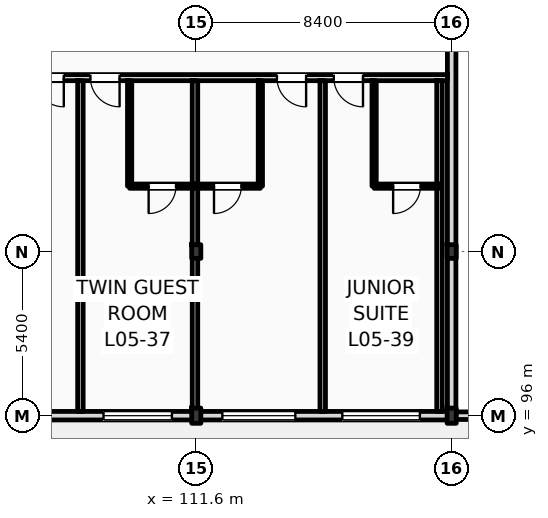
"""IFC4 building model, lengths in metres.
Left out: names, types, materials, properties, quantities, classifications, styles, units other than length and angle.
Written with IfcOpenShell. Run it as: python <this file> out.ifc"""

import sys

from ifc_helpers import new_model, si_unit, direction, frame, frame_2d, origin, origin_2d, place, context, subcontext, project, spatial, rectangle, i_section, extrude, element, fill, save


model = new_model("IFC4")
c1 = context("Model", 3, precision=1e-05, world=origin(), true_north=direction((0.0, 1.0)))
c2 = subcontext(c1, "Body", "Model", "MODEL_VIEW")
j1 = project(units=[si_unit("LENGTHUNIT", "METRE"), si_unit("PLANEANGLEUNIT", "RADIAN")], contexts=[c1])
p1 = place(None, origin())
s1 = spatial("IfcSite", under=j1, at=p1, CompositionType="ELEMENT")
p2 = place(p1, origin())
s2 = spatial("IfcBuilding", under=s1, at=p2, CompositionType="ELEMENT")
p3 = place(p2, frame((0.0, 0.0, 24.6)))
s3 = spatial("IfcBuildingStorey", under=s2, at=p3, CompositionType="ELEMENT", Elevation=24.6)
p4 = place(p3, frame((111.6, 96.0, 0.0), z_axis=(0.0, 0.0, 1.0), x_axis=(1.0, 0.0, 0.0)))
e1 = element("IfcColumn", 1, at=p4, inside=s3, PredefinedType="COLUMN", context=c2, shape_type="SweptSolid", body=[
    extrude(i_section(OverallWidth=0.3, OverallDepth=0.5, WebThickness=0.014, FlangeThickness=0.028, FilletRadius=0.027, at=origin_2d()), origin(), (0.0, 0.0, 1.0), 3.6),
])
p5 = place(p3, frame((111.6, 101.4, 0.0), z_axis=(0.0, 0.0, 1.0), x_axis=(1.0, 0.0, 0.0)))
e2 = element("IfcColumn", 2, at=p5, inside=s3, PredefinedType="COLUMN", context=c2, shape_type="SweptSolid", body=[
    extrude(i_section(OverallWidth=0.3, OverallDepth=0.45, WebThickness=0.014, FlangeThickness=0.026, FilletRadius=0.027, at=origin_2d()), origin(), (0.0, 0.0, 1.0), 3.6),
])
p6 = place(p3, frame((120.0, 96.0, 0.0), z_axis=(0.0, 0.0, 1.0), x_axis=(1.0, 0.0, 0.0)))
e3 = element("IfcColumn", 3, at=p6, inside=s3, PredefinedType="COLUMN", context=c2, shape_type="SweptSolid", body=[
    extrude(i_section(OverallWidth=0.3, OverallDepth=0.5, WebThickness=0.014, FlangeThickness=0.028, FilletRadius=0.027, at=origin_2d()), origin(), (0.0, 0.0, 1.0), 3.6),
])
p7 = place(p3, frame((120.0, 101.4, 0.0), z_axis=(0.0, 0.0, 1.0), x_axis=(1.0, 0.0, 0.0)))
e4 = element("IfcColumn", 4, at=p7, inside=s3, PredefinedType="COLUMN", context=c2, shape_type="SweptSolid", body=[
    extrude(i_section(OverallWidth=0.3, OverallDepth=0.45, WebThickness=0.014, FlangeThickness=0.026, FilletRadius=0.027, at=origin_2d()), origin(), (0.0, 0.0, 1.0), 3.6),
])
p8 = place(p3, frame((120.0, 96.0, 0.0), z_axis=(0.0, 0.0, 1.0), x_axis=(0.0, 1.0, 0.0)))
e5 = element("IfcWall", 5, at=p8, inside=s3, PredefinedType="STANDARD", context=c2, shape_type="SweptSolid", body=[
    extrude(rectangle(XDim=22.0, YDim=0.28, at=frame_2d((11.0, 0.0))), origin(), (0.0, 0.0, 1.0), 2.93),
])
p9 = place(p3, frame((25.2, 96.0, 0.0), z_axis=(0.0, 0.0, 1.0), x_axis=(1.0, 0.0, 0.0)))
e6 = element("IfcWall", 6, at=p9, inside=s3, PredefinedType="STANDARD", context=c2, shape_type="SweptSolid", body=[
    extrude(rectangle(XDim=94.8, YDim=0.28, at=frame_2d((47.4, 0.0))), origin(), (0.0, 0.0, 1.0), 2.78),
])
p10 = place(p9, frame((16.539, 0.0, 0.9)))
e7 = element("IfcOpeningElement", 7, at=p10, cuts=e6, PredefinedType="OPENING", context=c2, shape_type="SweptSolid", body=[
    extrude(rectangle(XDim=1.75, YDim=1.7, at=frame_2d((0.875, 0.85))), frame((0.0, 0.15, 0.0), z_axis=(0.0, -1.0, 0.0), x_axis=(1.0, 0.0, 0.0)), (0.0, 0.0, 1.0), 0.3),
])
p11 = place(p9, frame((20.367, 0.0, 0.9)))
e8 = element("IfcOpeningElement", 8, at=p11, cuts=e6, PredefinedType="OPENING", context=c2, shape_type="SweptSolid", body=[
    extrude(rectangle(XDim=2.0, YDim=1.7, at=frame_2d((1.0, 0.85))), frame((0.0, 0.15, 0.0), z_axis=(0.0, -1.0, 0.0), x_axis=(1.0, 0.0, 0.0)), (0.0, 0.0, 1.0), 0.3),
])
p12 = place(p9, frame((24.326, 0.0, 0.9)))
e9 = element("IfcOpeningElement", 9, at=p12, cuts=e6, PredefinedType="OPENING", context=c2, shape_type="SweptSolid", body=[
    extrude(rectangle(XDim=2.3, YDim=1.7, at=frame_2d((1.15, 0.85))), frame((0.0, 0.15, 0.0), z_axis=(0.0, -1.0, 0.0), x_axis=(1.0, 0.0, 0.0)), (0.0, 0.0, 1.0), 0.3),
])
p13 = place(p9, frame((27.684, 0.0, 0.9)))
e10 = element("IfcOpeningElement", 10, at=p13, cuts=e6, PredefinedType="OPENING", context=c2, shape_type="SweptSolid", body=[
    extrude(rectangle(XDim=2.6, YDim=1.7, at=frame_2d((1.3, 0.85))), frame((0.0, 0.15, 0.0), z_axis=(0.0, -1.0, 0.0), x_axis=(1.0, 0.0, 0.0)), (0.0, 0.0, 1.0), 0.3),
])
p14 = place(p9, frame((32.083, 0.0, 0.9)))
e11 = element("IfcOpeningElement", 11, at=p14, cuts=e6, PredefinedType="OPENING", context=c2, shape_type="SweptSolid", body=[
    extrude(rectangle(XDim=2.419, YDim=1.7, at=frame_2d((1.209, 0.85))), frame((0.0, 0.15, 0.0), z_axis=(0.0, -1.0, 0.0), x_axis=(1.0, 0.0, 0.0)), (0.0, 0.0, 1.0), 0.3),
])
p15 = place(p9, frame((35.322, 0.0, 0.9)))
e12 = element("IfcOpeningElement", 12, at=p15, cuts=e6, PredefinedType="OPENING", context=c2, shape_type="SweptSolid", body=[
    extrude(rectangle(XDim=2.868, YDim=1.7, at=frame_2d((1.434, 0.85))), frame((0.0, 0.15, 0.0), z_axis=(0.0, -1.0, 0.0), x_axis=(1.0, 0.0, 0.0)), (0.0, 0.0, 1.0), 0.3),
])
p16 = place(p9, frame((56.015, 0.0, 0.9)))
e13 = element("IfcOpeningElement", 13, at=p16, cuts=e6, PredefinedType="OPENING", context=c2, shape_type="SweptSolid", body=[
    extrude(rectangle(XDim=1.2, YDim=1.7, at=frame_2d((0.6, 0.85))), frame((0.0, 0.15, 0.0), z_axis=(0.0, -1.0, 0.0), x_axis=(1.0, 0.0, 0.0)), (0.0, 0.0, 1.0), 0.3),
])
p17 = place(p9, frame((59.888, 0.0, 0.9)))
e14 = element("IfcOpeningElement", 14, at=p17, cuts=e6, PredefinedType="OPENING", context=c2, shape_type="SweptSolid", body=[
    extrude(rectangle(XDim=1.35, YDim=1.7, at=frame_2d((0.675, 0.85))), frame((0.0, 0.15, 0.0), z_axis=(0.0, -1.0, 0.0), x_axis=(1.0, 0.0, 0.0)), (0.0, 0.0, 1.0), 0.3),
])
p18 = place(p9, frame((63.799, 0.0, 0.9)))
e15 = element("IfcOpeningElement", 15, at=p18, cuts=e6, PredefinedType="OPENING", context=c2, shape_type="SweptSolid", body=[
    extrude(rectangle(XDim=1.5, YDim=1.7, at=frame_2d((0.75, 0.85))), frame((0.0, 0.15, 0.0), z_axis=(0.0, -1.0, 0.0), x_axis=(1.0, 0.0, 0.0)), (0.0, 0.0, 1.0), 0.3),
])
p19 = place(p9, frame((67.709, 0.0, 0.9)))
e16 = element("IfcOpeningElement", 16, at=p19, cuts=e6, PredefinedType="OPENING", context=c2, shape_type="SweptSolid", body=[
    extrude(rectangle(XDim=1.65, YDim=1.7, at=frame_2d((0.825, 0.85))), frame((0.0, 0.15, 0.0), z_axis=(0.0, -1.0, 0.0), x_axis=(1.0, 0.0, 0.0)), (0.0, 0.0, 1.0), 0.3),
])
p20 = place(p9, frame((71.618, 0.0, 0.9)))
e17 = element("IfcOpeningElement", 17, at=p20, cuts=e6, PredefinedType="OPENING", context=c2, shape_type="SweptSolid", body=[
    extrude(rectangle(XDim=1.8, YDim=1.7, at=frame_2d((0.9, 0.85))), frame((0.0, 0.15, 0.0), z_axis=(0.0, -1.0, 0.0), x_axis=(1.0, 0.0, 0.0)), (0.0, 0.0, 1.0), 0.3),
])
p21 = place(p9, frame((75.129, 0.0, 0.9)))
e18 = element("IfcOpeningElement", 18, at=p21, cuts=e6, PredefinedType="OPENING", context=c2, shape_type="SweptSolid", body=[
    extrude(rectangle(XDim=1.95, YDim=1.7, at=frame_2d((0.975, 0.85))), frame((0.0, 0.15, 0.0), z_axis=(0.0, -1.0, 0.0), x_axis=(1.0, 0.0, 0.0)), (0.0, 0.0, 1.0), 0.3),
])
p22 = place(p9, frame((79.439, 0.0, 0.9)))
e19 = element("IfcOpeningElement", 19, at=p22, cuts=e6, PredefinedType="OPENING", context=c2, shape_type="SweptSolid", body=[
    extrude(rectangle(XDim=2.1, YDim=1.7, at=frame_2d((1.05, 0.85))), frame((0.0, 0.15, 0.0), z_axis=(0.0, -1.0, 0.0), x_axis=(1.0, 0.0, 0.0)), (0.0, 0.0, 1.0), 0.3),
])
p23 = place(p9, frame((83.349, 0.0, 0.9)))
e20 = element("IfcOpeningElement", 20, at=p23, cuts=e6, PredefinedType="OPENING", context=c2, shape_type="SweptSolid", body=[
    extrude(rectangle(XDim=2.25, YDim=1.7, at=frame_2d((1.125, 0.85))), frame((0.0, 0.15, 0.0), z_axis=(0.0, -1.0, 0.0), x_axis=(1.0, 0.0, 0.0)), (0.0, 0.0, 1.0), 0.3),
])
p24 = place(p9, frame((87.258, 0.0, 0.9)))
e21 = element("IfcOpeningElement", 21, at=p24, cuts=e6, PredefinedType="OPENING", context=c2, shape_type="SweptSolid", body=[
    extrude(rectangle(XDim=2.4, YDim=1.7, at=frame_2d((1.2, 0.85))), frame((0.0, 0.15, 0.0), z_axis=(0.0, -1.0, 0.0), x_axis=(1.0, 0.0, 0.0)), (0.0, 0.0, 1.0), 0.3),
])
p25 = place(p9, frame((91.204, 0.0, 0.9)))
e22 = element("IfcOpeningElement", 22, at=p25, cuts=e6, PredefinedType="OPENING", context=c2, shape_type="SweptSolid", body=[
    extrude(rectangle(XDim=2.55, YDim=1.7, at=frame_2d((1.275, 0.85))), frame((0.0, 0.15, 0.0), z_axis=(0.0, -1.0, 0.0), x_axis=(1.0, 0.0, 0.0)), (0.0, 0.0, 1.0), 0.3),
])
p26 = place(p3, frame((128.4, 96.0, 0.0), z_axis=(0.0, 0.0, 1.0), x_axis=(-1.0, 0.0, 0.0)))
e23 = element("IfcWall", 23, at=p26, inside=s3, PredefinedType="PARAPET", context=c2, shape_type="SweptSolid", body=[
    extrude(rectangle(XDim=8.4, YDim=0.25, at=frame_2d((4.2, 0.0))), origin(), (0.0, 0.0, 1.0), 1.15),
])
p27 = place(p3, frame((79.76, 107.12, 0.0), z_axis=(0.0, 0.0, 1.0), x_axis=(1.0, 0.0, 0.0)))
e24 = element("IfcWall", 24, at=p27, inside=s3, PredefinedType="PARTITIONING", context=c2, shape_type="SweptSolid", body=[
    extrude(rectangle(XDim=40.1, YDim=0.2, at=frame_2d((20.05, 0.0))), origin(), (0.0, 0.0, 1.0), 3.34),
])
p28 = place(p27, frame((2.65, 0.0, 0.0)))
e25 = element("IfcOpeningElement", 25, at=p28, cuts=e24, PredefinedType="OPENING", context=c2, shape_type="SweptSolid", body=[
    extrude(rectangle(XDim=0.96, YDim=2.2, at=frame_2d((0.48, 1.1))), frame((0.0, 0.11, 0.0), z_axis=(0.0, -1.0, 0.0), x_axis=(1.0, 0.0, 0.0)), (0.0, 0.0, 1.0), 0.22),
])
p29 = place(p27, frame((4.448, 0.0, 0.0)))
e26 = element("IfcOpeningElement", 26, at=p29, cuts=e24, PredefinedType="OPENING", context=c2, shape_type="SweptSolid", body=[
    extrude(rectangle(XDim=0.96, YDim=2.2, at=frame_2d((0.48, 1.1))), frame((0.0, 0.11, 0.0), z_axis=(0.0, -1.0, 0.0), x_axis=(1.0, 0.0, 0.0)), (0.0, 0.0, 1.0), 0.22),
])
p30 = place(p27, frame((10.583, 0.0, 0.0)))
e27 = element("IfcOpeningElement", 27, at=p30, cuts=e24, PredefinedType="OPENING", context=c2, shape_type="SweptSolid", body=[
    extrude(rectangle(XDim=0.96, YDim=2.2, at=frame_2d((0.48, 1.1))), frame((0.0, 0.11, 0.0), z_axis=(0.0, -1.0, 0.0), x_axis=(1.0, 0.0, 0.0)), (0.0, 0.0, 1.0), 0.22),
])
p31 = place(p27, frame((12.418, 0.0, 0.0)))
e28 = element("IfcOpeningElement", 28, at=p31, cuts=e24, PredefinedType="OPENING", context=c2, shape_type="SweptSolid", body=[
    extrude(rectangle(XDim=0.96, YDim=2.2, at=frame_2d((0.48, 1.1))), frame((0.0, 0.11, 0.0), z_axis=(0.0, -1.0, 0.0), x_axis=(1.0, 0.0, 0.0)), (0.0, 0.0, 1.0), 0.22),
])
p32 = place(p27, frame((18.553, 0.0, 0.0)))
e29 = element("IfcOpeningElement", 29, at=p32, cuts=e24, PredefinedType="OPENING", context=c2, shape_type="SweptSolid", body=[
    extrude(rectangle(XDim=0.96, YDim=2.2, at=frame_2d((0.48, 1.1))), frame((0.0, 0.11, 0.0), z_axis=(0.0, -1.0, 0.0), x_axis=(1.0, 0.0, 0.0)), (0.0, 0.0, 1.0), 0.22),
])
p33 = place(p27, frame((20.388, 0.0, 0.0)))
e30 = element("IfcOpeningElement", 30, at=p33, cuts=e24, PredefinedType="OPENING", context=c2, shape_type="SweptSolid", body=[
    extrude(rectangle(XDim=0.96, YDim=2.2, at=frame_2d((0.48, 1.1))), frame((0.0, 0.11, 0.0), z_axis=(0.0, -1.0, 0.0), x_axis=(1.0, 0.0, 0.0)), (0.0, 0.0, 1.0), 0.22),
])
p34 = place(p27, frame((26.523, 0.0, 0.0)))
e31 = element("IfcOpeningElement", 31, at=p34, cuts=e24, PredefinedType="OPENING", context=c2, shape_type="SweptSolid", body=[
    extrude(rectangle(XDim=0.96, YDim=2.2, at=frame_2d((0.48, 1.1))), frame((0.0, 0.11, 0.0), z_axis=(0.0, -1.0, 0.0), x_axis=(1.0, 0.0, 0.0)), (0.0, 0.0, 1.0), 0.22),
])
p35 = place(p27, frame((28.358, 0.0, 0.0)))
e32 = element("IfcOpeningElement", 32, at=p35, cuts=e24, PredefinedType="OPENING", context=c2, shape_type="SweptSolid", body=[
    extrude(rectangle(XDim=0.96, YDim=2.2, at=frame_2d((0.48, 1.1))), frame((0.0, 0.11, 0.0), z_axis=(0.0, -1.0, 0.0), x_axis=(1.0, 0.0, 0.0)), (0.0, 0.0, 1.0), 0.22),
])
p36 = place(p27, frame((34.493, 0.0, 0.0)))
e33 = element("IfcOpeningElement", 33, at=p36, cuts=e24, PredefinedType="OPENING", context=c2, shape_type="SweptSolid", body=[
    extrude(rectangle(XDim=0.96, YDim=2.2, at=frame_2d((0.48, 1.1))), frame((0.0, 0.11, 0.0), z_axis=(0.0, -1.0, 0.0), x_axis=(1.0, 0.0, 0.0)), (0.0, 0.0, 1.0), 0.22),
])
p37 = place(p27, frame((36.364, 0.0, 0.0)))
e34 = element("IfcOpeningElement", 34, at=p37, cuts=e24, PredefinedType="OPENING", context=c2, shape_type="SweptSolid", body=[
    extrude(rectangle(XDim=0.96, YDim=2.2, at=frame_2d((0.48, 1.1))), frame((0.0, 0.11, 0.0), z_axis=(0.0, -1.0, 0.0), x_axis=(1.0, 0.0, 0.0)), (0.0, 0.0, 1.0), 0.22),
])
p38 = place(p3, frame((107.789, 96.14, 0.0), z_axis=(0.0, 0.0, 1.0), x_axis=(0.0, 1.0, 0.0)))
e35 = element("IfcWall", 35, at=p38, inside=s3, PredefinedType="PARTITIONING", context=c2, shape_type="SweptSolid", body=[
    extrude(rectangle(XDim=10.88, YDim=0.18, at=frame_2d((5.44, 0.0))), origin(), (0.0, 0.0, 1.0), 3.34),
])
p39 = place(p3, frame((111.558, 96.14, 0.0), z_axis=(0.0, 0.0, 1.0), x_axis=(0.0, 1.0, 0.0)))
e36 = element("IfcWall", 36, at=p39, inside=s3, PredefinedType="PARTITIONING", context=c2, shape_type="SweptSolid", body=[
    extrude(rectangle(XDim=10.88, YDim=0.18, at=frame_2d((5.44, 0.0))), origin(), (0.0, 0.0, 1.0), 2.93),
])
p40 = place(p3, frame((109.408, 103.55, 0.0), z_axis=(0.0, 0.0, 1.0), x_axis=(0.0, 1.0, 0.0)))
e37 = element("IfcWall", 37, at=p40, inside=s3, PredefinedType="PARTITIONING", context=c2, shape_type="SweptSolid", body=[
    extrude(rectangle(XDim=3.47, YDim=0.14, at=frame_2d((1.735, 0.0))), origin(), (0.0, 0.0, 1.0), 3.34),
])
p41 = place(p3, frame((109.408, 103.55, 0.0), z_axis=(0.0, 0.0, 1.0), x_axis=(1.0, 0.0, 0.0)))
e38 = element("IfcWall", 38, at=p41, inside=s3, PredefinedType="PARTITIONING", context=c2, shape_type="SweptSolid", body=[
    extrude(rectangle(XDim=2.15, YDim=0.14, at=frame_2d((1.075, 0.0))), origin(), (0.0, 0.0, 1.0), 3.34),
])
p42 = place(p41, frame((0.625, 0.0, 0.0)))
e39 = element("IfcOpeningElement", 39, at=p42, cuts=e38, PredefinedType="OPENING", context=c2, shape_type="SweptSolid", body=[
    extrude(rectangle(XDim=0.9, YDim=2.1, at=frame_2d((0.45, 1.05))), frame((0.0, 0.08, 0.0), z_axis=(0.0, -1.0, 0.0), x_axis=(1.0, 0.0, 0.0)), (0.0, 0.0, 1.0), 0.16),
])
p43 = place(p3, frame((115.759, 96.14, 0.0), z_axis=(0.0, 0.0, 1.0), x_axis=(0.0, 1.0, 0.0)))
e40 = element("IfcWall", 40, at=p43, inside=s3, PredefinedType="PARTITIONING", context=c2, shape_type="SweptSolid", body=[
    extrude(rectangle(XDim=10.88, YDim=0.18, at=frame_2d((5.44, 0.0))), origin(), (0.0, 0.0, 1.0), 3.34),
])
p44 = place(p3, frame((113.708, 103.55, 0.0), z_axis=(0.0, 0.0, 1.0), x_axis=(0.0, 1.0, 0.0)))
e41 = element("IfcWall", 41, at=p44, inside=s3, PredefinedType="PARTITIONING", context=c2, shape_type="SweptSolid", body=[
    extrude(rectangle(XDim=3.47, YDim=0.14, at=frame_2d((1.735, 0.0))), origin(), (0.0, 0.0, 1.0), 3.34),
])
p45 = place(p3, frame((111.558, 103.55, 0.0), z_axis=(0.0, 0.0, 1.0), x_axis=(1.0, 0.0, 0.0)))
e42 = element("IfcWall", 42, at=p45, inside=s3, PredefinedType="PARTITIONING", context=c2, shape_type="SweptSolid", body=[
    extrude(rectangle(XDim=2.15, YDim=0.14, at=frame_2d((1.075, 0.0))), origin(), (0.0, 0.0, 1.0), 3.34),
])
p46 = place(p45, frame((0.625, 0.0, 0.0)))
e43 = element("IfcOpeningElement", 43, at=p46, cuts=e42, PredefinedType="OPENING", context=c2, shape_type="SweptSolid", body=[
    extrude(rectangle(XDim=0.9, YDim=2.1, at=frame_2d((0.45, 1.05))), frame((0.0, 0.08, 0.0), z_axis=(0.0, -1.0, 0.0), x_axis=(1.0, 0.0, 0.0)), (0.0, 0.0, 1.0), 0.16),
])
p47 = place(p3, frame((119.6, 96.14, 0.0), z_axis=(0.0, 0.0, 1.0), x_axis=(0.0, 1.0, 0.0)))
e44 = element("IfcWall", 44, at=p47, inside=s3, PredefinedType="PARTITIONING", context=c2, shape_type="SweptSolid", body=[
    extrude(rectangle(XDim=10.88, YDim=0.18, at=frame_2d((5.44, 0.0))), origin(), (0.0, 0.0, 1.0), 3.34),
])
p48 = place(p3, frame((117.45, 103.55, 0.0), z_axis=(0.0, 0.0, 1.0), x_axis=(0.0, 1.0, 0.0)))
e45 = element("IfcWall", 45, at=p48, inside=s3, PredefinedType="PARTITIONING", context=c2, shape_type="SweptSolid", body=[
    extrude(rectangle(XDim=3.47, YDim=0.14, at=frame_2d((1.735, 0.0))), origin(), (0.0, 0.0, 1.0), 3.34),
])
p49 = place(p3, frame((117.45, 103.55, 0.0), z_axis=(0.0, 0.0, 1.0), x_axis=(1.0, 0.0, 0.0)))
e46 = element("IfcWall", 46, at=p49, inside=s3, PredefinedType="PARTITIONING", context=c2, shape_type="SweptSolid", body=[
    extrude(rectangle(XDim=2.15, YDim=0.14, at=frame_2d((1.075, 0.0))), origin(), (0.0, 0.0, 1.0), 3.34),
])
p50 = place(p49, frame((0.625, 0.0, 0.0)))
e47 = element("IfcOpeningElement", 47, at=p50, cuts=e46, PredefinedType="OPENING", context=c2, shape_type="SweptSolid", body=[
    extrude(rectangle(XDim=0.9, YDim=2.1, at=frame_2d((0.45, 1.05))), frame((0.0, 0.08, 0.0), z_axis=(0.0, -1.0, 0.0), x_axis=(1.0, 0.0, 0.0)), (0.0, 0.0, 1.0), 0.16),
])
p51 = place(p23, origin())
e48 = element("IfcWindow", 48, at=p51, inside=s3, PartitioningType="DOUBLE_PANEL_VERTICAL", PredefinedType="WINDOW", context=c2, shape_type="SweptSolid", body=[
    extrude(rectangle(XDim=2.25, YDim=1.7, at=frame_2d((1.125, 0.85))), frame((0.0, 0.03, 0.0), z_axis=(0.0, -1.0, 0.0), x_axis=(1.0, 0.0, 0.0)), (0.0, 0.0, 1.0), 0.06),
])
fill(e20, e48)
p52 = place(p24, origin())
e49 = element("IfcWindow", 49, at=p52, inside=s3, PartitioningType="DOUBLE_PANEL_VERTICAL", PredefinedType="WINDOW", context=c2, shape_type="SweptSolid", body=[
    extrude(rectangle(XDim=2.4, YDim=1.7, at=frame_2d((1.2, 0.85))), frame((0.0, 0.03, 0.0), z_axis=(0.0, -1.0, 0.0), x_axis=(1.0, 0.0, 0.0)), (0.0, 0.0, 1.0), 0.06),
])
fill(e21, e49)
p53 = place(p25, origin())
e50 = element("IfcWindow", 50, at=p53, inside=s3, PartitioningType="DOUBLE_PANEL_VERTICAL", PredefinedType="WINDOW", context=c2, shape_type="SweptSolid", body=[
    extrude(rectangle(XDim=2.55, YDim=1.7, at=frame_2d((1.275, 0.85))), frame((0.0, 0.03, 0.0), z_axis=(0.0, -1.0, 0.0), x_axis=(1.0, 0.0, 0.0)), (0.0, 0.0, 1.0), 0.06),
])
fill(e22, e50)
p54 = place(p34, frame((0.96, 0.0, 0.0), z_axis=(0.0, 0.0, 1.0), x_axis=(-1.0, 0.0, 0.0)))
e51 = element("IfcDoor", 51, at=p54, inside=s3, OperationType="SINGLE_SWING_RIGHT", PredefinedType="DOOR", context=c2, shape_type="SweptSolid", body=[
    extrude(rectangle(XDim=0.96, YDim=2.2, at=frame_2d((0.48, 1.1))), frame((0.0, 0.025, 0.0), z_axis=(0.0, -1.0, 0.0), x_axis=(1.0, 0.0, 0.0)), (0.0, 0.0, 1.0), 0.05),
])
fill(e31, e51)
p55 = place(p35, frame((0.96, 0.0, 0.0), z_axis=(0.0, 0.0, 1.0), x_axis=(-1.0, 0.0, 0.0)))
e52 = element("IfcDoor", 52, at=p55, inside=s3, OperationType="SINGLE_SWING_RIGHT", PredefinedType="DOOR", context=c2, shape_type="SweptSolid", body=[
    extrude(rectangle(XDim=0.96, YDim=2.2, at=frame_2d((0.48, 1.1))), frame((0.0, 0.025, 0.0), z_axis=(0.0, -1.0, 0.0), x_axis=(1.0, 0.0, 0.0)), (0.0, 0.0, 1.0), 0.05),
])
fill(e32, e52)
p56 = place(p42, frame((0.9, 0.0, 0.0), z_axis=(0.0, 0.0, 1.0), x_axis=(-1.0, 0.0, 0.0)))
e53 = element("IfcDoor", 53, at=p56, inside=s3, OperationType="SINGLE_SWING_LEFT", PredefinedType="DOOR", context=c2, shape_type="SweptSolid", body=[
    extrude(rectangle(XDim=0.9, YDim=2.1, at=frame_2d((0.45, 1.05))), frame((0.0, 0.025, 0.0), z_axis=(0.0, -1.0, 0.0), x_axis=(1.0, 0.0, 0.0)), (0.0, 0.0, 1.0), 0.05),
])
fill(e39, e53)
p57 = place(p36, frame((0.96, 0.0, 0.0), z_axis=(0.0, 0.0, 1.0), x_axis=(-1.0, 0.0, 0.0)))
e54 = element("IfcDoor", 54, at=p57, inside=s3, OperationType="SINGLE_SWING_RIGHT", PredefinedType="DOOR", context=c2, shape_type="SweptSolid", body=[
    extrude(rectangle(XDim=0.96, YDim=2.2, at=frame_2d((0.48, 1.1))), frame((0.0, 0.025, 0.0), z_axis=(0.0, -1.0, 0.0), x_axis=(1.0, 0.0, 0.0)), (0.0, 0.0, 1.0), 0.05),
])
fill(e33, e54)
p58 = place(p46, frame((0.9, 0.0, 0.0), z_axis=(0.0, 0.0, 1.0), x_axis=(-1.0, 0.0, 0.0)))
e55 = element("IfcDoor", 55, at=p58, inside=s3, OperationType="SINGLE_SWING_LEFT", PredefinedType="DOOR", context=c2, shape_type="SweptSolid", body=[
    extrude(rectangle(XDim=0.9, YDim=2.1, at=frame_2d((0.45, 1.05))), frame((0.0, 0.025, 0.0), z_axis=(0.0, -1.0, 0.0), x_axis=(1.0, 0.0, 0.0)), (0.0, 0.0, 1.0), 0.05),
])
fill(e43, e55)
p59 = place(p37, frame((0.96, 0.0, 0.0), z_axis=(0.0, 0.0, 1.0), x_axis=(-1.0, 0.0, 0.0)))
e56 = element("IfcDoor", 56, at=p59, inside=s3, OperationType="SINGLE_SWING_RIGHT", PredefinedType="DOOR", context=c2, shape_type="SweptSolid", body=[
    extrude(rectangle(XDim=0.96, YDim=2.2, at=frame_2d((0.48, 1.1))), frame((0.0, 0.025, 0.0), z_axis=(0.0, -1.0, 0.0), x_axis=(1.0, 0.0, 0.0)), (0.0, 0.0, 1.0), 0.05),
])
fill(e34, e56)
p60 = place(p50, frame((0.9, 0.0, 0.0), z_axis=(0.0, 0.0, 1.0), x_axis=(-1.0, 0.0, 0.0)))
e57 = element("IfcDoor", 57, at=p60, inside=s3, OperationType="SINGLE_SWING_LEFT", PredefinedType="DOOR", context=c2, shape_type="SweptSolid", body=[
    extrude(rectangle(XDim=0.9, YDim=2.1, at=frame_2d((0.45, 1.05))), frame((0.0, 0.025, 0.0), z_axis=(0.0, -1.0, 0.0), x_axis=(1.0, 0.0, 0.0)), (0.0, 0.0, 1.0), 0.05),
])
fill(e47, e57)
save(model, sys.argv[1])
